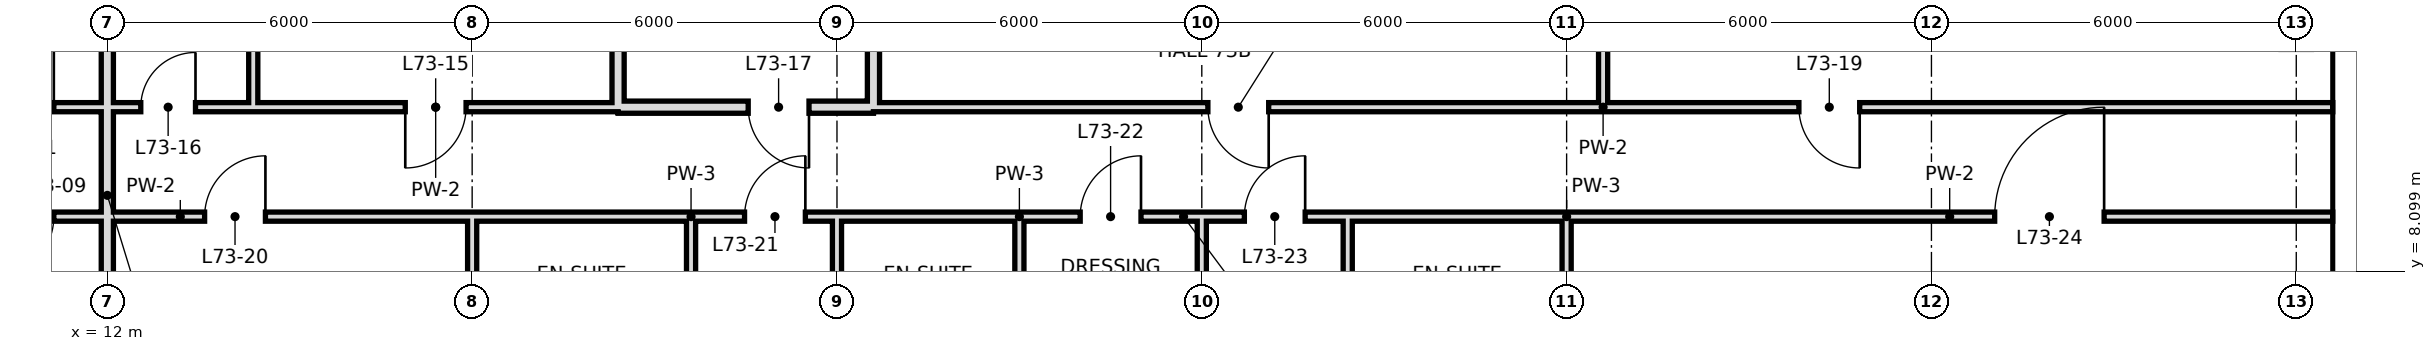
"""IFC4 building model, lengths in metres.
Left out: names, types, materials, properties, quantities, classifications, styles, units other than length and angle.
Written with IfcOpenShell. Run it as: python <this file> out.ifc"""

import sys

from ifc_helpers import new_model, si_unit, direction, frame, frame_2d, origin, place, context, subcontext, project, spatial, rectangle, extrude, element, fill, save


model = new_model("IFC4")
c1 = context("Model", 3, precision=1e-05, world=origin(), true_north=direction((0.0, 1.0)))
c2 = subcontext(c1, "Body", "Model", "MODEL_VIEW")
j1 = project(units=[si_unit("LENGTHUNIT", "METRE"), si_unit("PLANEANGLEUNIT", "RADIAN")], contexts=[c1])
p1 = place(None, origin())
s1 = spatial("IfcSite", under=j1, at=p1, CompositionType="ELEMENT")
p2 = place(p1, origin())
s2 = spatial("IfcBuilding", under=s1, at=p2, CompositionType="ELEMENT")
p3 = place(p2, frame((0.0, 0.0, 308.8)))
s3 = spatial("IfcBuildingStorey", under=s2, at=p3, CompositionType="ELEMENT", Elevation=308.8)
p4 = place(p3, frame((12.0, 0.0, 0.0), z_axis=(0.0, 0.0, 1.0), x_axis=(0.0, 1.0, 0.0)))
e1 = element("IfcWall", 1, at=p4, inside=s3, PredefinedType="SOLIDWALL", context=c2, shape_type="SweptSolid", body=[
    extrude(rectangle(XDim=18.7, YDim=0.2, at=frame_2d((9.35, 0.0))), origin(), (0.0, 0.0, 1.0), 2.72),
])
p5 = place(p3, frame((14.4, 10.8, 0.0), z_axis=(0.0, 0.0, 1.0), x_axis=(0.0, 1.0, 0.0)))
e2 = element("IfcWall", 2, at=p5, inside=s3, PredefinedType="PARTITIONING", context=c2, shape_type="SweptSolid", body=[
    extrude(rectangle(XDim=7.9, YDim=0.15, at=frame_2d((3.95, 0.0))), origin(), (0.0, 0.0, 1.0), 3.42),
])
p6 = place(p3, frame((18.0, 6.0, 0.0), z_axis=(0.0, 0.0, 1.0), x_axis=(0.0, 1.0, 0.0)))
e3 = element("IfcWall", 3, at=p6, inside=s3, PredefinedType="PARTITIONING", context=c2, shape_type="SweptSolid", body=[
    extrude(rectangle(XDim=3.0, YDim=0.15, at=frame_2d((1.5, 0.0))), origin(), (0.0, 0.0, 1.0), 2.72),
])
p7 = place(p3, frame((20.4, 10.8, 0.0), z_axis=(0.0, 0.0, 1.0), x_axis=(0.0, 1.0, 0.0)))
e4 = element("IfcWall", 4, at=p7, inside=s3, PredefinedType="SOLIDWALL", context=c2, shape_type="SweptSolid", body=[
    extrude(rectangle(XDim=7.9, YDim=0.2, at=frame_2d((3.95, 0.0))), origin(), (0.0, 0.0, 1.0), 2.72),
])
p8 = place(p3, frame((21.6, 6.0, 0.0), z_axis=(0.0, 0.0, 1.0), x_axis=(0.0, 1.0, 0.0)))
e5 = element("IfcWall", 5, at=p8, inside=s3, PredefinedType="PARTITIONING", context=c2, shape_type="SweptSolid", body=[
    extrude(rectangle(XDim=3.0, YDim=0.15, at=frame_2d((1.5, 0.0))), origin(), (0.0, 0.0, 1.0), 3.42),
])
p9 = place(p3, frame((24.0, 6.0, 0.0), z_axis=(0.0, 0.0, 1.0), x_axis=(0.0, 1.0, 0.0)))
e6 = element("IfcWall", 6, at=p9, inside=s3, PredefinedType="PARTITIONING", context=c2, shape_type="SweptSolid", body=[
    extrude(rectangle(XDim=3.0, YDim=0.15, at=frame_2d((1.5, 0.0))), origin(), (0.0, 0.0, 1.0), 2.72),
])
p10 = place(p3, frame((24.6, 10.8, 0.0), z_axis=(0.0, 0.0, 1.0), x_axis=(0.0, 1.0, 0.0)))
e7 = element("IfcWall", 7, at=p10, inside=s3, PredefinedType="SOLIDWALL", context=c2, shape_type="SweptSolid", body=[
    extrude(rectangle(XDim=7.9, YDim=0.2, at=frame_2d((3.95, 0.0))), origin(), (0.0, 0.0, 1.0), 2.72),
])
p11 = place(p3, frame((27.0, 6.0, 0.0), z_axis=(0.0, 0.0, 1.0), x_axis=(0.0, 1.0, 0.0)))
e8 = element("IfcWall", 8, at=p11, inside=s3, PredefinedType="PARTITIONING", context=c2, shape_type="SweptSolid", body=[
    extrude(rectangle(XDim=3.0, YDim=0.15, at=frame_2d((1.5, 0.0))), origin(), (0.0, 0.0, 1.0), 3.42),
])
p12 = place(p3, frame((30.0, -0.6, 0.0), z_axis=(0.0, 0.0, 1.0), x_axis=(0.0, 1.0, 0.0)))
e9 = element("IfcWall", 9, at=p12, inside=s3, PredefinedType="PARTITIONING", context=c2, shape_type="SweptSolid", body=[
    extrude(rectangle(XDim=9.6, YDim=0.15, at=frame_2d((4.8, 0.0))), origin(), (0.0, 0.0, 1.0), 2.72),
])
p13 = place(p3, frame((32.4, 6.0, 0.0), z_axis=(0.0, 0.0, 1.0), x_axis=(0.0, 1.0, 0.0)))
e10 = element("IfcWall", 10, at=p13, inside=s3, PredefinedType="PARTITIONING", context=c2, shape_type="SweptSolid", body=[
    extrude(rectangle(XDim=3.0, YDim=0.15, at=frame_2d((1.5, 0.0))), origin(), (0.0, 0.0, 1.0), 3.42),
])
p14 = place(p3, frame((36.0, 6.0, 0.0), z_axis=(0.0, 0.0, 1.0), x_axis=(0.0, 1.0, 0.0)))
e11 = element("IfcWall", 11, at=p14, inside=s3, PredefinedType="PARTITIONING", context=c2, shape_type="SweptSolid", body=[
    extrude(rectangle(XDim=3.0, YDim=0.15, at=frame_2d((1.5, 0.0))), origin(), (0.0, 0.0, 1.0), 2.72),
])
p15 = place(p3, frame((36.6, 10.8, 0.0), z_axis=(0.0, 0.0, 1.0), x_axis=(0.0, 1.0, 0.0)))
e12 = element("IfcWall", 12, at=p15, inside=s3, PredefinedType="PARTITIONING", context=c2, shape_type="SweptSolid", body=[
    extrude(rectangle(XDim=7.9, YDim=0.15, at=frame_2d((3.95, 0.0))), origin(), (0.0, 0.0, 1.0), 3.42),
])
p16 = place(p3, frame((20.4, 10.8, 0.0), z_axis=(0.0, 0.0, 1.0), x_axis=(1.0, 0.0, 0.0)))
e13 = element("IfcWall", 13, at=p16, inside=s3, PredefinedType="SOLIDWALL", context=c2, shape_type="SweptSolid", body=[
    extrude(rectangle(XDim=4.2, YDim=0.2, at=frame_2d((2.1, 0.0))), origin(), (0.0, 0.0, 1.0), 2.72),
])
p17 = place(p16, frame((2.14, 0.0, 0.0)))
e14 = element("IfcOpeningElement", 14, at=p17, cuts=e13, PredefinedType="OPENING", context=c2, shape_type="SweptSolid", body=[
    extrude(rectangle(XDim=1.0, YDim=2.4, at=frame_2d((0.5, 1.2))), frame((0.0, 0.11, 0.0), z_axis=(0.0, -1.0, 0.0), x_axis=(1.0, 0.0, 0.0)), (0.0, 0.0, 1.0), 0.22),
])
p18 = place(p3, frame((-10.2, 10.8, 0.0), z_axis=(0.0, 0.0, 1.0), x_axis=(1.0, 0.0, 0.0)))
e15 = element("IfcWall", 15, at=p18, inside=s3, PredefinedType="PARTITIONING", context=c2, shape_type="SweptSolid", body=[
    extrude(rectangle(XDim=22.2, YDim=0.15, at=frame_2d((11.1, 0.0))), origin(), (0.0, 0.0, 1.0), 3.42),
])
p19 = place(p18, frame((20.32, 0.0, 0.0)))
e16 = element("IfcOpeningElement", 16, at=p19, cuts=e15, PredefinedType="OPENING", context=c2, shape_type="SweptSolid", body=[
    extrude(rectangle(XDim=1.0, YDim=2.4, at=frame_2d((0.5, 1.2))), frame((0.0, 0.085, 0.0), z_axis=(0.0, -1.0, 0.0), x_axis=(1.0, 0.0, 0.0)), (0.0, 0.0, 1.0), 0.17),
])
p20 = place(p18, frame((3.4, 0.0, 0.0)))
e17 = element("IfcOpeningElement", 17, at=p20, cuts=e15, PredefinedType="OPENING", context=c2, shape_type="SweptSolid", body=[
    extrude(rectangle(XDim=1.0, YDim=2.4, at=frame_2d((0.5, 1.2))), frame((0.0, 0.085, 0.0), z_axis=(0.0, -1.0, 0.0), x_axis=(1.0, 0.0, 0.0)), (0.0, 0.0, 1.0), 0.17),
])
p21 = place(p18, frame((10.84, 0.0, 0.0)))
e18 = element("IfcOpeningElement", 18, at=p21, cuts=e15, PredefinedType="OPENING", context=c2, shape_type="SweptSolid", body=[
    extrude(rectangle(XDim=1.0, YDim=2.4, at=frame_2d((0.5, 1.2))), frame((0.0, 0.085, 0.0), z_axis=(0.0, -1.0, 0.0), x_axis=(1.0, 0.0, 0.0)), (0.0, 0.0, 1.0), 0.17),
])
p22 = place(p3, frame((14.4, 10.8, 0.0), z_axis=(0.0, 0.0, 1.0), x_axis=(1.0, 0.0, 0.0)))
e19 = element("IfcWall", 19, at=p22, inside=s3, PredefinedType="PARTITIONING", context=c2, shape_type="SweptSolid", body=[
    extrude(rectangle(XDim=6.0, YDim=0.15, at=frame_2d((3.0, 0.0))), origin(), (0.0, 0.0, 1.0), 3.42),
])
p23 = place(p22, frame((2.5, 0.0, 0.0)))
e20 = element("IfcOpeningElement", 20, at=p23, cuts=e19, PredefinedType="OPENING", context=c2, shape_type="SweptSolid", body=[
    extrude(rectangle(XDim=1.0, YDim=2.4, at=frame_2d((0.5, 1.2))), frame((0.0, 0.085, 0.0), z_axis=(0.0, -1.0, 0.0), x_axis=(1.0, 0.0, 0.0)), (0.0, 0.0, 1.0), 0.17),
])
p24 = place(p3, frame((24.6, 10.8, 0.0), z_axis=(0.0, 0.0, 1.0), x_axis=(1.0, 0.0, 0.0)))
e21 = element("IfcWall", 21, at=p24, inside=s3, PredefinedType="PARTITIONING", context=c2, shape_type="SweptSolid", body=[
    extrude(rectangle(XDim=24.0, YDim=0.15, at=frame_2d((12.0, 0.0))), origin(), (0.0, 0.0, 1.0), 3.42),
])
p25 = place(p24, frame((5.5, 0.0, 0.0)))
e22 = element("IfcOpeningElement", 22, at=p25, cuts=e21, PredefinedType="OPENING", context=c2, shape_type="SweptSolid", body=[
    extrude(rectangle(XDim=1.0, YDim=2.4, at=frame_2d((0.5, 1.2))), frame((0.0, 0.085, 0.0), z_axis=(0.0, -1.0, 0.0), x_axis=(1.0, 0.0, 0.0)), (0.0, 0.0, 1.0), 0.17),
])
p26 = place(p24, frame((15.22, 0.0, 0.0)))
e23 = element("IfcOpeningElement", 23, at=p26, cuts=e21, PredefinedType="OPENING", context=c2, shape_type="SweptSolid", body=[
    extrude(rectangle(XDim=1.0, YDim=2.4, at=frame_2d((0.5, 1.2))), frame((0.0, 0.085, 0.0), z_axis=(0.0, -1.0, 0.0), x_axis=(1.0, 0.0, 0.0)), (0.0, 0.0, 1.0), 0.17),
])
p27 = place(p3, frame((12.0, 10.8, 0.0), z_axis=(0.0, 0.0, 1.0), x_axis=(1.0, 0.0, 0.0)))
e24 = element("IfcWall", 24, at=p27, inside=s3, PredefinedType="PARTITIONING", context=c2, shape_type="SweptSolid", body=[
    extrude(rectangle(XDim=2.4, YDim=0.15, at=frame_2d((1.2, 0.0))), origin(), (0.0, 0.0, 1.0), 3.42),
])
p28 = place(p27, frame((0.55, 0.0, 0.0)))
e25 = element("IfcOpeningElement", 25, at=p28, cuts=e24, PredefinedType="OPENING", context=c2, shape_type="SweptSolid", body=[
    extrude(rectangle(XDim=0.9, YDim=2.4, at=frame_2d((0.45, 1.2))), frame((0.0, 0.085, 0.0), z_axis=(0.0, -1.0, 0.0), x_axis=(1.0, 0.0, 0.0)), (0.0, 0.0, 1.0), 0.17),
])
p29 = place(p3, frame((8.4, 9.0, 0.0), z_axis=(0.0, 0.0, 1.0), x_axis=(1.0, 0.0, 0.0)))
e26 = element("IfcWall", 26, at=p29, inside=s3, PredefinedType="PARTITIONING", context=c2, shape_type="SweptSolid", body=[
    extrude(rectangle(XDim=9.6, YDim=0.15, at=frame_2d((4.8, 0.0))), origin(), (0.0, 0.0, 1.0), 3.42),
])
p30 = place(p29, frame((1.72, 0.0, 0.0)))
e27 = element("IfcOpeningElement", 27, at=p30, cuts=e26, PredefinedType="OPENING", context=c2, shape_type="SweptSolid", body=[
    extrude(rectangle(XDim=1.0, YDim=2.4, at=frame_2d((0.5, 1.2))), frame((0.0, 0.085, 0.0), z_axis=(0.0, -1.0, 0.0), x_axis=(1.0, 0.0, 0.0)), (0.0, 0.0, 1.0), 0.17),
])
p31 = place(p29, frame((5.2, 0.0, 0.0)))
e28 = element("IfcOpeningElement", 28, at=p31, cuts=e26, PredefinedType="OPENING", context=c2, shape_type="SweptSolid", body=[
    extrude(rectangle(XDim=1.0, YDim=2.4, at=frame_2d((0.5, 1.2))), frame((0.0, 0.085, 0.0), z_axis=(0.0, -1.0, 0.0), x_axis=(1.0, 0.0, 0.0)), (0.0, 0.0, 1.0), 0.17),
])
p32 = place(p3, frame((21.6, 9.0, 0.0), z_axis=(0.0, 0.0, 1.0), x_axis=(1.0, 0.0, 0.0)))
e29 = element("IfcWall", 29, at=p32, inside=s3, PredefinedType="PARTITIONING", context=c2, shape_type="SweptSolid", body=[
    extrude(rectangle(XDim=2.4, YDim=0.15, at=frame_2d((1.2, 0.0))), origin(), (0.0, 0.0, 1.0), 3.42),
])
p33 = place(p32, frame((0.88, 0.0, 0.0)))
e30 = element("IfcOpeningElement", 30, at=p33, cuts=e29, PredefinedType="OPENING", context=c2, shape_type="SweptSolid", body=[
    extrude(rectangle(XDim=1.0, YDim=2.4, at=frame_2d((0.5, 1.2))), frame((0.0, 0.085, 0.0), z_axis=(0.0, -1.0, 0.0), x_axis=(1.0, 0.0, 0.0)), (0.0, 0.0, 1.0), 0.17),
])
p34 = place(p3, frame((27.0, 9.0, 0.0), z_axis=(0.0, 0.0, 1.0), x_axis=(1.0, 0.0, 0.0)))
e31 = element("IfcWall", 31, at=p34, inside=s3, PredefinedType="PARTITIONING", context=c2, shape_type="SweptSolid", body=[
    extrude(rectangle(XDim=5.4, YDim=0.15, at=frame_2d((2.7, 0.0))), origin(), (0.0, 0.0, 1.0), 3.42),
])
p35 = place(p34, frame((1.0, 0.0, 0.0)))
e32 = element("IfcOpeningElement", 32, at=p35, cuts=e31, PredefinedType="OPENING", context=c2, shape_type="SweptSolid", body=[
    extrude(rectangle(XDim=1.0, YDim=2.4, at=frame_2d((0.5, 1.2))), frame((0.0, 0.085, 0.0), z_axis=(0.0, -1.0, 0.0), x_axis=(1.0, 0.0, 0.0)), (0.0, 0.0, 1.0), 0.17),
])
p36 = place(p34, frame((3.7, 0.0, 0.0)))
e33 = element("IfcOpeningElement", 33, at=p36, cuts=e31, PredefinedType="OPENING", context=c2, shape_type="SweptSolid", body=[
    extrude(rectangle(XDim=1.0, YDim=2.4, at=frame_2d((0.5, 1.2))), frame((0.0, 0.085, 0.0), z_axis=(0.0, -1.0, 0.0), x_axis=(1.0, 0.0, 0.0)), (0.0, 0.0, 1.0), 0.17),
])
p37 = place(p3, frame((36.0, 9.0, 0.0), z_axis=(0.0, 0.0, 1.0), x_axis=(1.0, 0.0, 0.0)))
e34 = element("IfcWall", 34, at=p37, inside=s3, PredefinedType="PARTITIONING", context=c2, shape_type="SweptSolid", body=[
    extrude(rectangle(XDim=12.6, YDim=0.15, at=frame_2d((6.3, 0.0))), origin(), (0.0, 0.0, 1.0), 3.42),
])
p38 = place(p37, frame((7.04, 0.0, 0.0)))
e35 = element("IfcOpeningElement", 35, at=p38, cuts=e34, PredefinedType="OPENING", context=c2, shape_type="SweptSolid", body=[
    extrude(rectangle(XDim=1.8, YDim=2.4, at=frame_2d((0.9, 1.2))), frame((0.0, 0.085, 0.0), z_axis=(0.0, -1.0, 0.0), x_axis=(1.0, 0.0, 0.0)), (0.0, 0.0, 1.0), 0.17),
])
p39 = place(p3, frame((18.0, 9.0, 0.0), z_axis=(0.0, 0.0, 1.0), x_axis=(1.0, 0.0, 0.0)))
e36 = element("IfcWall", 36, at=p39, inside=s3, PredefinedType="PARTITIONING", context=c2, shape_type="SweptSolid", body=[
    extrude(rectangle(XDim=3.6, YDim=0.15, at=frame_2d((1.8, 0.0))), origin(), (0.0, 0.0, 1.0), 3.42),
])
p40 = place(p3, frame((24.0, 9.0, 0.0), z_axis=(0.0, 0.0, 1.0), x_axis=(1.0, 0.0, 0.0)))
e37 = element("IfcWall", 37, at=p40, inside=s3, PredefinedType="PARTITIONING", context=c2, shape_type="SweptSolid", body=[
    extrude(rectangle(XDim=3.0, YDim=0.15, at=frame_2d((1.5, 0.0))), origin(), (0.0, 0.0, 1.0), 3.42),
])
p41 = place(p3, frame((32.4, 9.0, 0.0), z_axis=(0.0, 0.0, 1.0), x_axis=(1.0, 0.0, 0.0)))
e38 = element("IfcWall", 38, at=p41, inside=s3, PredefinedType="PARTITIONING", context=c2, shape_type="SweptSolid", body=[
    extrude(rectangle(XDim=3.6, YDim=0.15, at=frame_2d((1.8, 0.0))), origin(), (0.0, 0.0, 1.0), 3.42),
])
p42 = place(p19, frame((1.0, 0.0, 0.0), z_axis=(0.0, 0.0, 1.0), x_axis=(-1.0, 0.0, 0.0)))
e39 = element("IfcDoor", 39, at=p42, inside=s3, OperationType="SINGLE_SWING_LEFT", PredefinedType="DOOR", context=c2, shape_type="SweptSolid", body=[
    extrude(rectangle(XDim=1.0, YDim=2.4, at=frame_2d((0.5, 1.2))), frame((0.0, 0.025, 0.0), z_axis=(0.0, -1.0, 0.0), x_axis=(1.0, 0.0, 0.0)), (0.0, 0.0, 1.0), 0.05),
])
fill(e16, e39)
p43 = place(p30, frame((1.0, 0.0, 0.0), z_axis=(0.0, 0.0, 1.0), x_axis=(-1.0, 0.0, 0.0)))
e40 = element("IfcDoor", 40, at=p43, inside=s3, OperationType="SINGLE_SWING_RIGHT", PredefinedType="DOOR", context=c2, shape_type="SweptSolid", body=[
    extrude(rectangle(XDim=1.0, YDim=2.4, at=frame_2d((0.5, 1.2))), frame((0.0, 0.025, 0.0), z_axis=(0.0, -1.0, 0.0), x_axis=(1.0, 0.0, 0.0)), (0.0, 0.0, 1.0), 0.05),
])
fill(e27, e40)
p44 = place(p23, frame((1.0, 0.0, 0.0), z_axis=(0.0, 0.0, 1.0), x_axis=(-1.0, 0.0, 0.0)))
e41 = element("IfcDoor", 41, at=p44, inside=s3, OperationType="SINGLE_SWING_RIGHT", PredefinedType="DOOR", context=c2, shape_type="SweptSolid", body=[
    extrude(rectangle(XDim=1.0, YDim=2.4, at=frame_2d((0.5, 1.2))), frame((0.0, 0.025, 0.0), z_axis=(0.0, -1.0, 0.0), x_axis=(1.0, 0.0, 0.0)), (0.0, 0.0, 1.0), 0.05),
])
fill(e20, e41)
p45 = place(p28, frame((0.9, 0.0, 0.0), z_axis=(0.0, 0.0, 1.0), x_axis=(-1.0, 0.0, 0.0)))
e42 = element("IfcDoor", 42, at=p45, inside=s3, OperationType="SINGLE_SWING_LEFT", PredefinedType="DOOR", context=c2, shape_type="SweptSolid", body=[
    extrude(rectangle(XDim=0.9, YDim=2.4, at=frame_2d((0.45, 1.2))), frame((0.0, 0.025, 0.0), z_axis=(0.0, -1.0, 0.0), x_axis=(1.0, 0.0, 0.0)), (0.0, 0.0, 1.0), 0.05),
])
fill(e25, e42)
p46 = place(p17, origin())
e43 = element("IfcDoor", 43, at=p46, inside=s3, OperationType="SINGLE_SWING_RIGHT", PredefinedType="DOOR", context=c2, shape_type="SweptSolid", body=[
    extrude(rectangle(XDim=1.0, YDim=2.4, at=frame_2d((0.5, 1.2))), frame((0.0, 0.025, 0.0), z_axis=(0.0, -1.0, 0.0), x_axis=(1.0, 0.0, 0.0)), (0.0, 0.0, 1.0), 0.05),
])
fill(e14, e43)
p47 = place(p25, origin())
e44 = element("IfcDoor", 44, at=p47, inside=s3, OperationType="SINGLE_SWING_RIGHT", PredefinedType="DOOR", context=c2, shape_type="SweptSolid", body=[
    extrude(rectangle(XDim=1.0, YDim=2.4, at=frame_2d((0.5, 1.2))), frame((0.0, 0.025, 0.0), z_axis=(0.0, -1.0, 0.0), x_axis=(1.0, 0.0, 0.0)), (0.0, 0.0, 1.0), 0.05),
])
fill(e22, e44)
p48 = place(p26, origin())
e45 = element("IfcDoor", 45, at=p48, inside=s3, OperationType="SINGLE_SWING_RIGHT", PredefinedType="DOOR", context=c2, shape_type="SweptSolid", body=[
    extrude(rectangle(XDim=1.0, YDim=2.4, at=frame_2d((0.5, 1.2))), frame((0.0, 0.025, 0.0), z_axis=(0.0, -1.0, 0.0), x_axis=(1.0, 0.0, 0.0)), (0.0, 0.0, 1.0), 0.05),
])
fill(e23, e45)
p49 = place(p31, frame((1.0, 0.0, 0.0), z_axis=(0.0, 0.0, 1.0), x_axis=(-1.0, 0.0, 0.0)))
e46 = element("IfcDoor", 46, at=p49, inside=s3, OperationType="SINGLE_SWING_LEFT", PredefinedType="DOOR", context=c2, shape_type="SweptSolid", body=[
    extrude(rectangle(XDim=1.0, YDim=2.4, at=frame_2d((0.5, 1.2))), frame((0.0, 0.025, 0.0), z_axis=(0.0, -1.0, 0.0), x_axis=(1.0, 0.0, 0.0)), (0.0, 0.0, 1.0), 0.05),
])
fill(e28, e46)
p50 = place(p33, frame((1.0, 0.0, 0.0), z_axis=(0.0, 0.0, 1.0), x_axis=(-1.0, 0.0, 0.0)))
e47 = element("IfcDoor", 47, at=p50, inside=s3, OperationType="SINGLE_SWING_LEFT", PredefinedType="DOOR", context=c2, shape_type="SweptSolid", body=[
    extrude(rectangle(XDim=1.0, YDim=2.4, at=frame_2d((0.5, 1.2))), frame((0.0, 0.025, 0.0), z_axis=(0.0, -1.0, 0.0), x_axis=(1.0, 0.0, 0.0)), (0.0, 0.0, 1.0), 0.05),
])
fill(e30, e47)
p51 = place(p35, frame((1.0, 0.0, 0.0), z_axis=(0.0, 0.0, 1.0), x_axis=(-1.0, 0.0, 0.0)))
e48 = element("IfcDoor", 48, at=p51, inside=s3, OperationType="SINGLE_SWING_LEFT", PredefinedType="DOOR", context=c2, shape_type="SweptSolid", body=[
    extrude(rectangle(XDim=1.0, YDim=2.4, at=frame_2d((0.5, 1.2))), frame((0.0, 0.025, 0.0), z_axis=(0.0, -1.0, 0.0), x_axis=(1.0, 0.0, 0.0)), (0.0, 0.0, 1.0), 0.05),
])
fill(e32, e48)
p52 = place(p36, frame((1.0, 0.0, 0.0), z_axis=(0.0, 0.0, 1.0), x_axis=(-1.0, 0.0, 0.0)))
e49 = element("IfcDoor", 49, at=p52, inside=s3, OperationType="SINGLE_SWING_LEFT", PredefinedType="DOOR", context=c2, shape_type="SweptSolid", body=[
    extrude(rectangle(XDim=1.0, YDim=2.4, at=frame_2d((0.5, 1.2))), frame((0.0, 0.025, 0.0), z_axis=(0.0, -1.0, 0.0), x_axis=(1.0, 0.0, 0.0)), (0.0, 0.0, 1.0), 0.05),
])
fill(e33, e49)
p53 = place(p38, frame((1.8, 0.0, 0.0), z_axis=(0.0, 0.0, 1.0), x_axis=(-1.0, 0.0, 0.0)))
e50 = element("IfcDoor", 50, at=p53, inside=s3, OperationType="SINGLE_SWING_LEFT", PredefinedType="DOOR", context=c2, shape_type="SweptSolid", body=[
    extrude(rectangle(XDim=1.8, YDim=2.4, at=frame_2d((0.9, 1.2))), frame((0.0, 0.025, 0.0), z_axis=(0.0, -1.0, 0.0), x_axis=(1.0, 0.0, 0.0)), (0.0, 0.0, 1.0), 0.05),
])
fill(e35, e50)
save(model, sys.argv[1])
